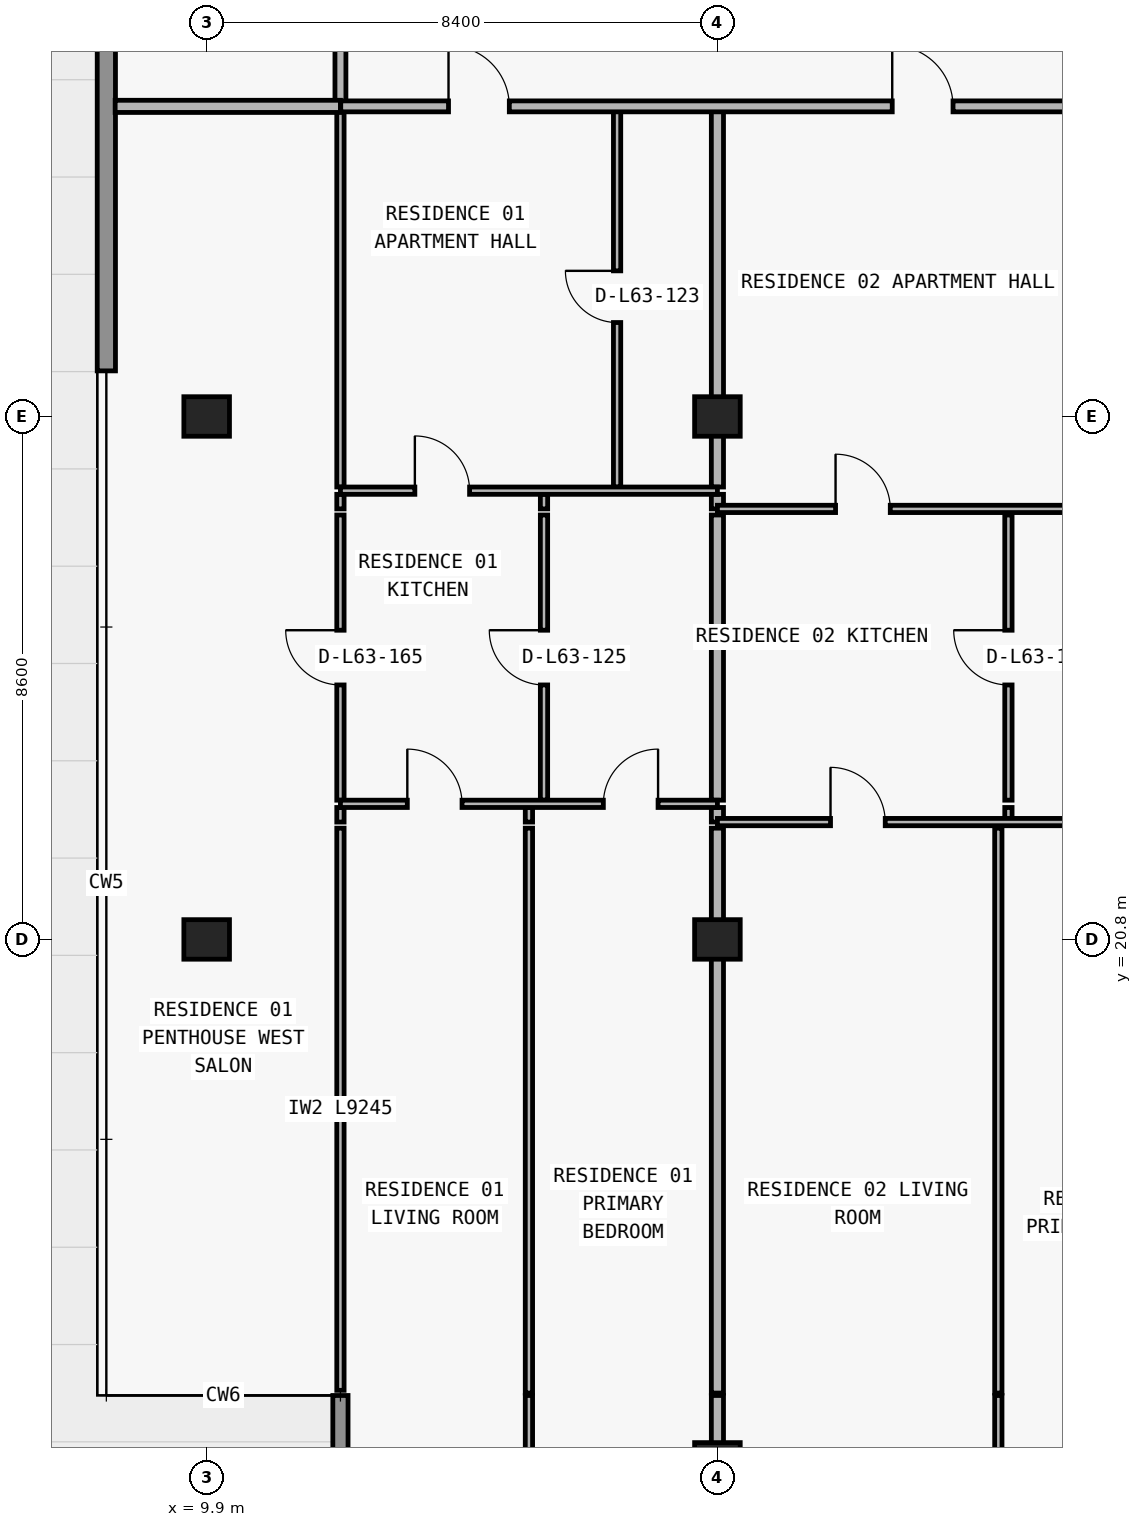
"""IFC4 building model, lengths in metres.
Left out: names, types, materials, properties, quantities, classifications, styles, units other than length and angle.
Written with IfcOpenShell. Run it as: python <this file> out.ifc"""

import sys

from ifc_helpers import new_model, si_unit, direction, frame, frame_2d, origin, origin_2d, place, context, subcontext, project, spatial, rectangle, extrude, element, fill, save


model = new_model("IFC4")
c1 = context("Model", 3, precision=1e-05, world=origin(), true_north=direction((0.0, 1.0)))
c2 = subcontext(c1, "Body", "Model", "MODEL_VIEW")
j1 = project(units=[si_unit("LENGTHUNIT", "METRE"), si_unit("PLANEANGLEUNIT", "RADIAN")], contexts=[c1])
p1 = place(None, origin())
s1 = spatial("IfcSite", under=j1, at=p1, CompositionType="ELEMENT")
p2 = place(p1, origin())
s2 = spatial("IfcBuilding", under=s1, at=p2, CompositionType="ELEMENT")
p3 = place(p2, frame((0.0, 0.0, 226.5)))
s3 = spatial("IfcBuildingStorey", under=s2, at=p3, CompositionType="ELEMENT", Elevation=226.5)
for number, where, z_axis, x_axis in (
    (1, (18.3, 12.2, 0.0), (0.0, 0.0, 1.0), (1.0, 0.0, 0.0)),
    (2, (9.9, 20.8, 0.0), (0.0, 0.0, 1.0), (1.0, 0.0, 0.0)),
    (3, (18.3, 20.8, 0.0), (0.0, 0.0, 1.0), (1.0, 0.0, 0.0)),
    (4, (9.9, 29.4, 0.0), (0.0, 0.0, 1.0), (1.0, 0.0, 0.0)),
    (5, (18.3, 29.4, 0.0), (0.0, 0.0, 1.0), (1.0, 0.0, 0.0)),
):
    element("IfcColumn", number, at=place(p3, frame(where, z_axis=z_axis, x_axis=x_axis)), inside=s3, PredefinedType="COLUMN", context=c2, shape_type="SweptSolid", body=[
        extrude(rectangle(XDim=0.75, YDim=0.65, at=origin_2d()), origin(), (0.0, 0.0, 1.0), 3.05),
    ])
p4 = place(p3, frame((12.1, 13.3, 0.0), z_axis=(0.0, 0.0, 1.0), x_axis=(0.0, -1.0, 0.0)))
e6 = element("IfcWall", 6, at=p4, inside=s3, PredefinedType="ELEMENTEDWALL", context=c2, shape_type="SweptSolid", body=[
    extrude(rectangle(XDim=3.45, YDim=0.25, at=frame_2d((1.725, 0.0))), origin(), (0.0, 0.0, 1.0), 3.05),
])
p5 = place(p3, frame((8.25, 30.15, 0.0), z_axis=(0.0, 0.0, 1.0), x_axis=(0.0, 1.0, 0.0)))
e7 = element("IfcWall", 7, at=p5, inside=s3, PredefinedType="STANDARD", context=c2, shape_type="SweptSolid", body=[
    extrude(rectangle(XDim=16.85, YDim=0.3, at=frame_2d((8.425, 0.0))), origin(), (0.0, 0.0, 1.0), 3.05),
])
p6 = place(p3, frame((12.1, 13.385, 0.0), z_axis=(0.0, 0.0, 1.0), x_axis=(0.0, 1.0, 0.0)))
e8 = element("IfcWall", 8, at=p6, inside=s3, PredefinedType="PARTITIONING", context=c2, shape_type="SweptSolid", body=[
    extrude(rectangle(XDim=9.245, YDim=0.12, at=frame_2d((4.623, 0.0))), origin(), (0.0, 0.0, 1.0), 3.05),
])
p7 = place(p3, frame((12.1, 22.73, 0.0), z_axis=(0.0, 0.0, 1.0), x_axis=(0.0, 1.0, 0.0)))
e9 = element("IfcWall", 9, at=p7, inside=s3, PredefinedType="PARTITIONING", context=c2, shape_type="SweptSolid", body=[
    extrude(rectangle(XDim=0.24, YDim=0.12, at=frame_2d((0.12, 0.0))), origin(), (0.0, 0.0, 1.0), 3.05),
])
p8 = place(p3, frame((12.1, 23.09, 0.0), z_axis=(0.0, 0.0, 1.0), x_axis=(0.0, 1.0, 0.0)))
e10 = element("IfcWall", 10, at=p8, inside=s3, PredefinedType="PARTITIONING", context=c2, shape_type="SweptSolid", body=[
    extrude(rectangle(XDim=4.69, YDim=0.12, at=frame_2d((2.345, 0.0))), origin(), (0.0, 0.0, 1.0), 3.05),
])
p9 = place(p8, frame((1.895, 0.0, 0.0)))
e11 = element("IfcOpeningElement", 11, at=p9, cuts=e10, PredefinedType="OPENING", context=c2, shape_type="SweptSolid", body=[
    extrude(rectangle(XDim=0.9, YDim=2.15, at=frame_2d((0.45, 1.075))), frame((0.0, 0.07, 0.0), z_axis=(0.0, -1.0, 0.0), x_axis=(1.0, 0.0, 0.0)), (0.0, 0.0, 1.0), 0.14),
])
p10 = place(p3, frame((12.1, 27.88, 0.0), z_axis=(0.0, 0.0, 1.0), x_axis=(0.0, 1.0, 0.0)))
e12 = element("IfcWall", 12, at=p10, inside=s3, PredefinedType="PARTITIONING", context=c2, shape_type="SweptSolid", body=[
    extrude(rectangle(XDim=0.24, YDim=0.12, at=frame_2d((0.12, 0.0))), origin(), (0.0, 0.0, 1.0), 3.05),
])
p11 = place(p3, frame((12.1, 28.24, 0.0), z_axis=(0.0, 0.0, 1.0), x_axis=(0.0, 1.0, 0.0)))
e13 = element("IfcWall", 13, at=p11, inside=s3, PredefinedType="PARTITIONING", context=c2, shape_type="SweptSolid", body=[
    extrude(rectangle(XDim=6.26, YDim=0.12, at=frame_2d((3.13, 0.0))), origin(), (0.0, 0.0, 1.0), 3.05),
])
p12 = place(p3, frame((12.1, 34.505, 0.0), z_axis=(0.0, 0.0, 1.0), x_axis=(0.0, 1.0, 0.0)))
e14 = element("IfcWall", 14, at=p12, inside=s3, PredefinedType="PARTITIONING", context=c2, shape_type="SweptSolid", body=[
    extrude(rectangle(XDim=2.495, YDim=0.18, at=frame_2d((1.248, 0.0))), origin(), (0.0, 0.0, 1.0), 3.05),
])
p13 = place(p3, frame((15.2, 9.995, 0.0), z_axis=(0.0, 0.0, 1.0), x_axis=(0.0, 1.0, 0.0)))
e15 = element("IfcWall", 15, at=p13, inside=s3, PredefinedType="PARTITIONING", context=c2, shape_type="SweptSolid", body=[
    extrude(rectangle(XDim=3.305, YDim=0.12, at=frame_2d((1.652, 0.0))), origin(), (0.0, 0.0, 1.0), 3.05),
])
p14 = place(p3, frame((15.2, 13.34, 0.0), z_axis=(0.0, 0.0, 1.0), x_axis=(0.0, 1.0, 0.0)))
e16 = element("IfcWall", 16, at=p14, inside=s3, PredefinedType="PARTITIONING", context=c2, shape_type="SweptSolid", body=[
    extrude(rectangle(XDim=9.29, YDim=0.12, at=frame_2d((4.645, 0.0))), origin(), (0.0, 0.0, 1.0), 3.05),
])
p15 = place(p3, frame((15.2, 22.73, 0.0), z_axis=(0.0, 0.0, 1.0), x_axis=(0.0, 1.0, 0.0)))
e17 = element("IfcWall", 17, at=p15, inside=s3, PredefinedType="PARTITIONING", context=c2, shape_type="SweptSolid", body=[
    extrude(rectangle(XDim=0.24, YDim=0.12, at=frame_2d((0.12, 0.0))), origin(), (0.0, 0.0, 1.0), 3.05),
])
p16 = place(p3, frame((15.448, 23.09, 0.0), z_axis=(0.0, 0.0, 1.0), x_axis=(0.0, 1.0, 0.0)))
e18 = element("IfcWall", 18, at=p16, inside=s3, PredefinedType="PARTITIONING", context=c2, shape_type="SweptSolid", body=[
    extrude(rectangle(XDim=4.69, YDim=0.12, at=frame_2d((2.345, 0.0))), origin(), (0.0, 0.0, 1.0), 3.05),
])
p17 = place(p16, frame((1.895, 0.0, 0.0)))
e19 = element("IfcOpeningElement", 19, at=p17, cuts=e18, PredefinedType="OPENING", context=c2, shape_type="SweptSolid", body=[
    extrude(rectangle(XDim=0.9, YDim=2.15, at=frame_2d((0.45, 1.075))), frame((0.0, 0.07, 0.0), z_axis=(0.0, -1.0, 0.0), x_axis=(1.0, 0.0, 0.0)), (0.0, 0.0, 1.0), 0.14),
])
p18 = place(p3, frame((15.448, 27.88, 0.0), z_axis=(0.0, 0.0, 1.0), x_axis=(0.0, 1.0, 0.0)))
e20 = element("IfcWall", 20, at=p18, inside=s3, PredefinedType="PARTITIONING", context=c2, shape_type="SweptSolid", body=[
    extrude(rectangle(XDim=0.24, YDim=0.12, at=frame_2d((0.12, 0.0))), origin(), (0.0, 0.0, 1.0), 3.05),
])
p19 = place(p3, frame((16.65, 28.24, 0.0), z_axis=(0.0, 0.0, 1.0), x_axis=(0.0, 1.0, 0.0)))
e21 = element("IfcWall", 21, at=p19, inside=s3, PredefinedType="PARTITIONING", context=c2, shape_type="SweptSolid", body=[
    extrude(rectangle(XDim=6.26, YDim=0.12, at=frame_2d((3.13, 0.0))), origin(), (0.0, 0.0, 1.0), 3.05),
])
p20 = place(p19, frame((2.705, 0.0, 0.0)))
e22 = element("IfcOpeningElement", 22, at=p20, cuts=e21, PredefinedType="OPENING", context=c2, shape_type="SweptSolid", body=[
    extrude(rectangle(XDim=0.85, YDim=2.1, at=frame_2d((0.425, 1.05))), frame((0.0, 0.07, 0.0), z_axis=(0.0, -1.0, 0.0), x_axis=(1.0, 0.0, 0.0)), (0.0, 0.0, 1.0), 0.14),
])
p21 = place(p3, frame((18.3, 9.995, 0.0), z_axis=(0.0, 0.0, 1.0), x_axis=(0.0, 1.0, 0.0)))
e23 = element("IfcWall", 23, at=p21, inside=s3, PredefinedType="PARTITIONING", context=c2, shape_type="SweptSolid", body=[
    extrude(rectangle(XDim=3.305, YDim=0.2, at=frame_2d((1.652, 0.0))), origin(), (0.0, 0.0, 1.0), 2.263),
])
p22 = place(p3, frame((18.3, 13.34, 0.0), z_axis=(0.0, 0.0, 1.0), x_axis=(0.0, 1.0, 0.0)))
e24 = element("IfcWall", 24, at=p22, inside=s3, PredefinedType="PARTITIONING", context=c2, shape_type="SweptSolid", body=[
    extrude(rectangle(XDim=9.29, YDim=0.2, at=frame_2d((4.645, 0.0))), origin(), (0.0, 0.0, 1.0), 2.263),
])
p23 = place(p3, frame((18.3, 22.73, 0.0), z_axis=(0.0, 0.0, 1.0), x_axis=(0.0, 1.0, 0.0)))
e25 = element("IfcWall", 25, at=p23, inside=s3, PredefinedType="PARTITIONING", context=c2, shape_type="SweptSolid", body=[
    extrude(rectangle(XDim=0.24, YDim=0.2, at=frame_2d((0.12, 0.0))), origin(), (0.0, 0.0, 1.0), 2.263),
])
p24 = place(p3, frame((18.3, 23.09, 0.0), z_axis=(0.0, 0.0, 1.0), x_axis=(0.0, 1.0, 0.0)))
e26 = element("IfcWall", 26, at=p24, inside=s3, PredefinedType="PARTITIONING", context=c2, shape_type="SweptSolid", body=[
    extrude(rectangle(XDim=4.69, YDim=0.2, at=frame_2d((2.345, 0.0))), origin(), (0.0, 0.0, 1.0), 2.263),
])
p25 = place(p3, frame((18.3, 27.88, 0.0), z_axis=(0.0, 0.0, 1.0), x_axis=(0.0, 1.0, 0.0)))
e27 = element("IfcWall", 27, at=p25, inside=s3, PredefinedType="PARTITIONING", context=c2, shape_type="SweptSolid", body=[
    extrude(rectangle(XDim=0.24, YDim=0.2, at=frame_2d((0.12, 0.0))), origin(), (0.0, 0.0, 1.0), 2.263),
])
p26 = place(p3, frame((18.3, 28.24, 0.0), z_axis=(0.0, 0.0, 1.0), x_axis=(0.0, 1.0, 0.0)))
e28 = element("IfcWall", 28, at=p26, inside=s3, PredefinedType="PARTITIONING", context=c2, shape_type="SweptSolid", body=[
    extrude(rectangle(XDim=6.26, YDim=0.2, at=frame_2d((3.13, 0.0))), origin(), (0.0, 0.0, 1.0), 2.263),
])
p27 = place(p3, frame((22.92, 9.995, 0.0), z_axis=(0.0, 0.0, 1.0), x_axis=(0.0, 1.0, 0.0)))
e29 = element("IfcWall", 29, at=p27, inside=s3, PredefinedType="PARTITIONING", context=c2, shape_type="SweptSolid", body=[
    extrude(rectangle(XDim=3.305, YDim=0.12, at=frame_2d((1.652, 0.0))), origin(), (0.0, 0.0, 1.0), 3.05),
])
p28 = place(p3, frame((22.92, 13.34, 0.0), z_axis=(0.0, 0.0, 1.0), x_axis=(0.0, 1.0, 0.0)))
e30 = element("IfcWall", 30, at=p28, inside=s3, PredefinedType="PARTITIONING", context=c2, shape_type="SweptSolid", body=[
    extrude(rectangle(XDim=9.29, YDim=0.12, at=frame_2d((4.645, 0.0))), origin(), (0.0, 0.0, 1.0), 3.05),
])
p29 = place(p3, frame((23.086, 22.73, 0.0), z_axis=(0.0, 0.0, 1.0), x_axis=(0.0, 1.0, 0.0)))
e31 = element("IfcWall", 31, at=p29, inside=s3, PredefinedType="PARTITIONING", context=c2, shape_type="SweptSolid", body=[
    extrude(rectangle(XDim=0.24, YDim=0.12, at=frame_2d((0.12, 0.0))), origin(), (0.0, 0.0, 1.0), 3.05),
])
p30 = place(p3, frame((23.086, 23.09, 0.0), z_axis=(0.0, 0.0, 1.0), x_axis=(0.0, 1.0, 0.0)))
e32 = element("IfcWall", 32, at=p30, inside=s3, PredefinedType="PARTITIONING", context=c2, shape_type="SweptSolid", body=[
    extrude(rectangle(XDim=4.69, YDim=0.12, at=frame_2d((2.345, 0.0))), origin(), (0.0, 0.0, 1.0), 3.05),
])
p31 = place(p30, frame((1.895, 0.0, 0.0)))
e33 = element("IfcOpeningElement", 33, at=p31, cuts=e32, PredefinedType="OPENING", context=c2, shape_type="SweptSolid", body=[
    extrude(rectangle(XDim=0.9, YDim=2.15, at=frame_2d((0.45, 1.075))), frame((0.0, 0.07, 0.0), z_axis=(0.0, -1.0, 0.0), x_axis=(1.0, 0.0, 0.0)), (0.0, 0.0, 1.0), 0.14),
])
p32 = place(p3, frame((18.3, 22.73, 0.0), z_axis=(0.0, 0.0, 1.0), x_axis=(1.0, 0.0, 0.0)))
e34 = element("IfcWall", 34, at=p32, inside=s3, PredefinedType="PARTITIONING", context=c2, shape_type="SweptSolid", body=[
    extrude(rectangle(XDim=8.18, YDim=0.12, at=frame_2d((4.09, 0.0))), origin(), (0.0, 0.0, 1.0), 3.05),
])
p33 = place(p32, frame((1.86, 0.0, 0.0)))
e35 = element("IfcOpeningElement", 35, at=p33, cuts=e34, PredefinedType="OPENING", context=c2, shape_type="SweptSolid", body=[
    extrude(rectangle(XDim=0.9, YDim=2.15, at=frame_2d((0.45, 1.075))), frame((0.0, 0.07, 0.0), z_axis=(0.0, -1.0, 0.0), x_axis=(1.0, 0.0, 0.0)), (0.0, 0.0, 1.0), 0.14),
])
p34 = place(p32, frame((6.033, 0.0, 0.0)))
e36 = element("IfcOpeningElement", 36, at=p34, cuts=e34, PredefinedType="OPENING", context=c2, shape_type="SweptSolid", body=[
    extrude(rectangle(XDim=0.9, YDim=2.15, at=frame_2d((0.45, 1.075))), frame((0.0, 0.07, 0.0), z_axis=(0.0, -1.0, 0.0), x_axis=(1.0, 0.0, 0.0)), (0.0, 0.0, 1.0), 0.14),
])
p35 = place(p3, frame((12.1, 23.03, 0.0), z_axis=(0.0, 0.0, 1.0), x_axis=(1.0, 0.0, 0.0)))
e37 = element("IfcWall", 37, at=p35, inside=s3, PredefinedType="PARTITIONING", context=c2, shape_type="SweptSolid", body=[
    extrude(rectangle(XDim=6.2, YDim=0.12, at=frame_2d((3.1, 0.0))), origin(), (0.0, 0.0, 1.0), 3.05),
])
p36 = place(p35, frame((1.1, 0.0, 0.0)))
e38 = element("IfcOpeningElement", 38, at=p36, cuts=e37, PredefinedType="OPENING", context=c2, shape_type="SweptSolid", body=[
    extrude(rectangle(XDim=0.9, YDim=2.15, at=frame_2d((0.45, 1.075))), frame((0.0, 0.07, 0.0), z_axis=(0.0, -1.0, 0.0), x_axis=(1.0, 0.0, 0.0)), (0.0, 0.0, 1.0), 0.14),
])
p37 = place(p35, frame((4.324, 0.0, 0.0)))
e39 = element("IfcOpeningElement", 39, at=p37, cuts=e37, PredefinedType="OPENING", context=c2, shape_type="SweptSolid", body=[
    extrude(rectangle(XDim=0.9, YDim=2.15, at=frame_2d((0.45, 1.075))), frame((0.0, 0.07, 0.0), z_axis=(0.0, -1.0, 0.0), x_axis=(1.0, 0.0, 0.0)), (0.0, 0.0, 1.0), 0.14),
])
p38 = place(p3, frame((18.3, 27.88, 0.0), z_axis=(0.0, 0.0, 1.0), x_axis=(1.0, 0.0, 0.0)))
e40 = element("IfcWall", 40, at=p38, inside=s3, PredefinedType="PARTITIONING", context=c2, shape_type="SweptSolid", body=[
    extrude(rectangle(XDim=8.18, YDim=0.12, at=frame_2d((4.09, 0.0))), origin(), (0.0, 0.0, 1.0), 3.05),
])
p39 = place(p38, frame((1.943, 0.0, 0.0)))
e41 = element("IfcOpeningElement", 41, at=p39, cuts=e40, PredefinedType="OPENING", context=c2, shape_type="SweptSolid", body=[
    extrude(rectangle(XDim=0.9, YDim=2.15, at=frame_2d((0.45, 1.075))), frame((0.0, 0.07, 0.0), z_axis=(0.0, -1.0, 0.0), x_axis=(1.0, 0.0, 0.0)), (0.0, 0.0, 1.0), 0.14),
])
p40 = place(p3, frame((12.1, 28.18, 0.0), z_axis=(0.0, 0.0, 1.0), x_axis=(1.0, 0.0, 0.0)))
e42 = element("IfcWall", 42, at=p40, inside=s3, PredefinedType="PARTITIONING", context=c2, shape_type="SweptSolid", body=[
    extrude(rectangle(XDim=6.2, YDim=0.12, at=frame_2d((3.1, 0.0))), origin(), (0.0, 0.0, 1.0), 3.05),
])
p41 = place(p40, frame((1.224, 0.0, 0.0)))
e43 = element("IfcOpeningElement", 43, at=p41, cuts=e42, PredefinedType="OPENING", context=c2, shape_type="SweptSolid", body=[
    extrude(rectangle(XDim=0.9, YDim=2.15, at=frame_2d((0.45, 1.075))), frame((0.0, 0.07, 0.0), z_axis=(0.0, -1.0, 0.0), x_axis=(1.0, 0.0, 0.0)), (0.0, 0.0, 1.0), 0.14),
])
p42 = place(p3, frame((8.395, 34.5, 0.0), z_axis=(0.0, 0.0, 1.0), x_axis=(1.0, 0.0, 0.0)))
e44 = element("IfcWall", 44, at=p42, inside=s3, PredefinedType="PARTITIONING", context=c2, shape_type="SweptSolid", body=[
    extrude(rectangle(XDim=3.705, YDim=0.2, at=frame_2d((1.853, 0.0))), origin(), (0.0, 0.0, 1.0), 3.05),
])
p43 = place(p3, frame((12.105, 34.5, 0.0), z_axis=(0.0, 0.0, 1.0), x_axis=(1.0, 0.0, 0.0)))
e45 = element("IfcWall", 45, at=p43, inside=s3, PredefinedType="PARTITIONING", context=c2, shape_type="SweptSolid", body=[
    extrude(rectangle(XDim=27.099, YDim=0.18, at=frame_2d((13.55, 0.0))), origin(), (0.0, 0.0, 1.0), 3.05),
])
p44 = place(p43, frame((1.772, 0.0, 0.0)))
e46 = element("IfcOpeningElement", 46, at=p44, cuts=e45, PredefinedType="OPENING", context=c2, shape_type="SweptSolid", body=[
    extrude(rectangle(XDim=1.0, YDim=2.2, at=frame_2d((0.5, 1.1))), frame((0.0, 0.1, 0.0), z_axis=(0.0, -1.0, 0.0), x_axis=(1.0, 0.0, 0.0)), (0.0, 0.0, 1.0), 0.2),
])
p45 = place(p43, frame((9.07, 0.0, 0.0)))
e47 = element("IfcOpeningElement", 47, at=p45, cuts=e45, PredefinedType="OPENING", context=c2, shape_type="SweptSolid", body=[
    extrude(rectangle(XDim=1.0, YDim=2.2, at=frame_2d((0.5, 1.1))), frame((0.0, 0.1, 0.0), z_axis=(0.0, -1.0, 0.0), x_axis=(1.0, 0.0, 0.0)), (0.0, 0.0, 1.0), 0.2),
])
p46 = place(p43, frame((17.47, 0.0, 0.0)))
e48 = element("IfcOpeningElement", 48, at=p46, cuts=e45, PredefinedType="OPENING", context=c2, shape_type="SweptSolid", body=[
    extrude(rectangle(XDim=1.0, YDim=2.2, at=frame_2d((0.5, 1.1))), frame((0.0, 0.1, 0.0), z_axis=(0.0, -1.0, 0.0), x_axis=(1.0, 0.0, 0.0)), (0.0, 0.0, 1.0), 0.2),
])
p47 = place(p43, frame((24.547, 0.0, 0.0)))
e49 = element("IfcOpeningElement", 49, at=p47, cuts=e45, PredefinedType="OPENING", context=c2, shape_type="SweptSolid", body=[
    extrude(rectangle(XDim=1.0, YDim=2.2, at=frame_2d((0.5, 1.1))), frame((0.0, 0.1, 0.0), z_axis=(0.0, -1.0, 0.0), x_axis=(1.0, 0.0, 0.0)), (0.0, 0.0, 1.0), 0.2),
])
p48 = place(p44, origin())
e50 = element("IfcDoor", 50, at=p48, inside=s3, OperationType="SINGLE_SWING_LEFT", PredefinedType="DOOR", context=c2, shape_type="SweptSolid", body=[
    extrude(rectangle(XDim=1.0, YDim=2.2, at=frame_2d((0.5, 1.1))), frame((0.0, 0.025, 0.0), z_axis=(0.0, -1.0, 0.0), x_axis=(1.0, 0.0, 0.0)), (0.0, 0.0, 1.0), 0.05),
])
fill(e46, e50)
p49 = place(p20, origin())
e51 = element("IfcDoor", 51, at=p49, inside=s3, OperationType="SINGLE_SWING_RIGHT", PredefinedType="DOOR", context=c2, shape_type="SweptSolid", body=[
    extrude(rectangle(XDim=0.85, YDim=2.1, at=frame_2d((0.425, 1.05))), frame((0.0, 0.025, 0.0), z_axis=(0.0, -1.0, 0.0), x_axis=(1.0, 0.0, 0.0)), (0.0, 0.0, 1.0), 0.05),
])
fill(e22, e51)
p50 = place(p41, origin())
e52 = element("IfcDoor", 52, at=p50, inside=s3, OperationType="SINGLE_SWING_LEFT", PredefinedType="DOOR", context=c2, shape_type="SweptSolid", body=[
    extrude(rectangle(XDim=0.9, YDim=2.15, at=frame_2d((0.45, 1.075))), frame((0.0, 0.025, 0.0), z_axis=(0.0, -1.0, 0.0), x_axis=(1.0, 0.0, 0.0)), (0.0, 0.0, 1.0), 0.05),
])
fill(e43, e52)
p51 = place(p17, origin())
e53 = element("IfcDoor", 53, at=p51, inside=s3, OperationType="SINGLE_SWING_RIGHT", PredefinedType="DOOR", context=c2, shape_type="SweptSolid", body=[
    extrude(rectangle(XDim=0.9, YDim=2.15, at=frame_2d((0.45, 1.075))), frame((0.0, 0.025, 0.0), z_axis=(0.0, -1.0, 0.0), x_axis=(1.0, 0.0, 0.0)), (0.0, 0.0, 1.0), 0.05),
])
fill(e19, e53)
p52 = place(p36, origin())
e54 = element("IfcDoor", 54, at=p52, inside=s3, OperationType="SINGLE_SWING_LEFT", PredefinedType="DOOR", context=c2, shape_type="SweptSolid", body=[
    extrude(rectangle(XDim=0.9, YDim=2.15, at=frame_2d((0.45, 1.075))), frame((0.0, 0.025, 0.0), z_axis=(0.0, -1.0, 0.0), x_axis=(1.0, 0.0, 0.0)), (0.0, 0.0, 1.0), 0.05),
])
fill(e38, e54)
p53 = place(p37, origin())
e55 = element("IfcDoor", 55, at=p53, inside=s3, OperationType="SINGLE_SWING_RIGHT", PredefinedType="DOOR", context=c2, shape_type="SweptSolid", body=[
    extrude(rectangle(XDim=0.9, YDim=2.15, at=frame_2d((0.45, 1.075))), frame((0.0, 0.025, 0.0), z_axis=(0.0, -1.0, 0.0), x_axis=(1.0, 0.0, 0.0)), (0.0, 0.0, 1.0), 0.05),
])
fill(e39, e55)
p54 = place(p45, origin())
e56 = element("IfcDoor", 56, at=p54, inside=s3, OperationType="SINGLE_SWING_LEFT", PredefinedType="DOOR", context=c2, shape_type="SweptSolid", body=[
    extrude(rectangle(XDim=1.0, YDim=2.2, at=frame_2d((0.5, 1.1))), frame((0.0, 0.025, 0.0), z_axis=(0.0, -1.0, 0.0), x_axis=(1.0, 0.0, 0.0)), (0.0, 0.0, 1.0), 0.05),
])
fill(e47, e56)
p55 = place(p39, origin())
e57 = element("IfcDoor", 57, at=p55, inside=s3, OperationType="SINGLE_SWING_LEFT", PredefinedType="DOOR", context=c2, shape_type="SweptSolid", body=[
    extrude(rectangle(XDim=0.9, YDim=2.15, at=frame_2d((0.45, 1.075))), frame((0.0, 0.025, 0.0), z_axis=(0.0, -1.0, 0.0), x_axis=(1.0, 0.0, 0.0)), (0.0, 0.0, 1.0), 0.05),
])
fill(e41, e57)
p56 = place(p31, origin())
e58 = element("IfcDoor", 58, at=p56, inside=s3, OperationType="SINGLE_SWING_RIGHT", PredefinedType="DOOR", context=c2, shape_type="SweptSolid", body=[
    extrude(rectangle(XDim=0.9, YDim=2.15, at=frame_2d((0.45, 1.075))), frame((0.0, 0.025, 0.0), z_axis=(0.0, -1.0, 0.0), x_axis=(1.0, 0.0, 0.0)), (0.0, 0.0, 1.0), 0.05),
])
fill(e33, e58)
p57 = place(p33, origin())
e59 = element("IfcDoor", 59, at=p57, inside=s3, OperationType="SINGLE_SWING_LEFT", PredefinedType="DOOR", context=c2, shape_type="SweptSolid", body=[
    extrude(rectangle(XDim=0.9, YDim=2.15, at=frame_2d((0.45, 1.075))), frame((0.0, 0.025, 0.0), z_axis=(0.0, -1.0, 0.0), x_axis=(1.0, 0.0, 0.0)), (0.0, 0.0, 1.0), 0.05),
])
fill(e35, e59)
p58 = place(p9, origin())
e60 = element("IfcDoor", 60, at=p58, inside=s3, OperationType="SINGLE_SWING_RIGHT", PredefinedType="DOOR", context=c2, shape_type="SweptSolid", body=[
    extrude(rectangle(XDim=0.9, YDim=2.15, at=frame_2d((0.45, 1.075))), frame((0.0, 0.025, 0.0), z_axis=(0.0, -1.0, 0.0), x_axis=(1.0, 0.0, 0.0)), (0.0, 0.0, 1.0), 0.05),
])
fill(e11, e60)
save(model, sys.argv[1])
